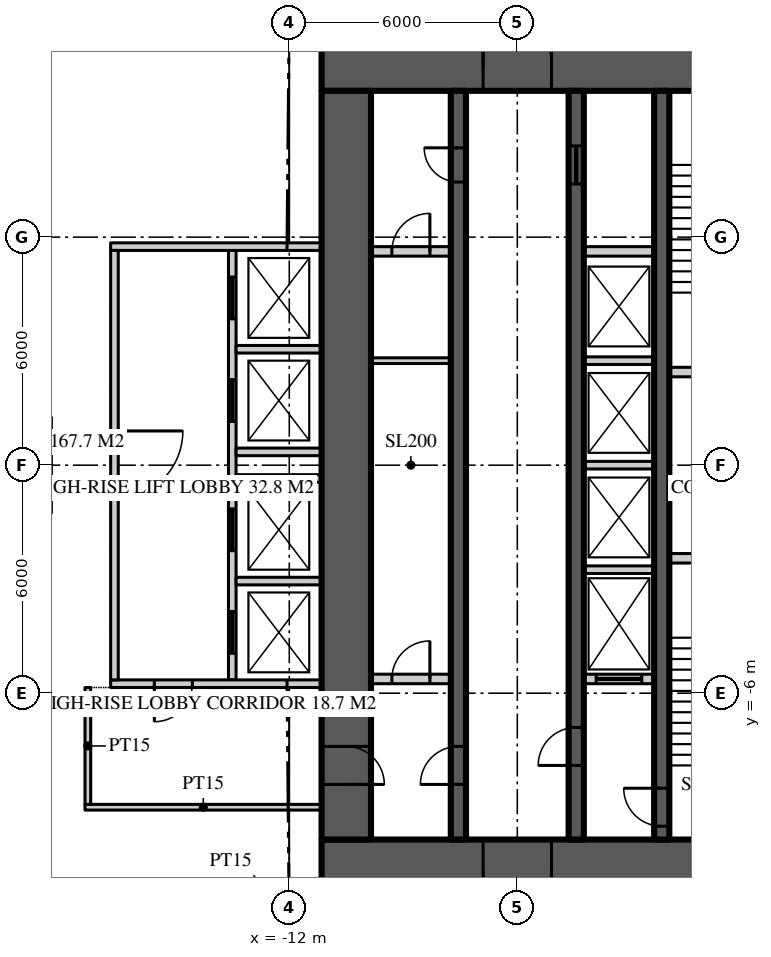
"""IFC4 building model, lengths in metres.
Left out: names, types, materials, properties, quantities, classifications, styles, units other than length and angle.
Written with IfcOpenShell. Run it as: python <this file> out.ifc"""

import sys

from ifc_helpers import new_model, si_unit, direction, frame, frame_2d, origin, place, context, subcontext, project, spatial, rectangle, extrude, element, fill, save


model = new_model("IFC4")
c1 = context("Model", 3, precision=1e-05, world=origin(), true_north=direction((0.0, 1.0)))
c2 = subcontext(c1, "Body", "Model", "MODEL_VIEW")
j1 = project(units=[si_unit("LENGTHUNIT", "METRE"), si_unit("PLANEANGLEUNIT", "RADIAN")], contexts=[c1])
p1 = place(None, origin())
s1 = spatial("IfcSite", under=j1, at=p1, CompositionType="ELEMENT")
p2 = place(p1, origin())
s2 = spatial("IfcBuilding", under=s1, at=p2, CompositionType="ELEMENT")
p3 = place(p2, frame((0.0, 0.0, 194.4)))
s3 = spatial("IfcBuildingStorey", under=s2, at=p3, CompositionType="ELEMENT", Elevation=194.4)
p4 = place(p3, frame((-11.15, 10.5, 0.0), z_axis=(0.0, 0.0, 1.0), x_axis=(1.0, 0.0, 0.0)))
e1 = element("IfcWall", 1, at=p4, inside=s3, PredefinedType="SHEAR", context=c2, shape_type="SweptSolid", body=[
    extrude(rectangle(XDim=22.3, YDim=1.3, at=frame_2d((11.15, 0.0))), origin(), (0.0, 0.0, 1.0), 4.5),
])
p5 = place(p4, frame((4.25, 0.0, 0.0)))
e2 = element("IfcOpeningElement", 2, at=p5, cuts=e1, PredefinedType="OPENING", context=c2, shape_type="SweptSolid", body=[
    extrude(rectangle(XDim=1.8, YDim=2.2, at=frame_2d((0.9, 1.1))), frame((0.0, 0.66, 0.0), z_axis=(0.0, -1.0, 0.0), x_axis=(1.0, 0.0, 0.0)), (0.0, 0.0, 1.0), 1.32),
])
p6 = place(p4, frame((16.25, 0.0, 0.0)))
e3 = element("IfcOpeningElement", 3, at=p6, cuts=e1, PredefinedType="OPENING", context=c2, shape_type="SweptSolid", body=[
    extrude(rectangle(XDim=1.8, YDim=2.2, at=frame_2d((0.9, 1.1))), frame((0.0, 0.66, 0.0), z_axis=(0.0, -1.0, 0.0), x_axis=(1.0, 0.0, 0.0)), (0.0, 0.0, 1.0), 1.32),
])
p7 = place(p3, frame((11.15, -10.5, 0.0), z_axis=(0.0, 0.0, 1.0), x_axis=(-1.0, 0.0, 0.0)))
e4 = element("IfcWall", 4, at=p7, inside=s3, PredefinedType="SHEAR", context=c2, shape_type="SweptSolid", body=[
    extrude(rectangle(XDim=22.3, YDim=1.3, at=frame_2d((11.15, 0.0))), origin(), (0.0, 0.0, 1.0), 4.5),
])
p8 = place(p7, frame((16.25, 0.0, 0.0)))
e5 = element("IfcOpeningElement", 5, at=p8, cuts=e4, PredefinedType="OPENING", context=c2, shape_type="SweptSolid", body=[
    extrude(rectangle(XDim=1.8, YDim=2.2, at=frame_2d((0.9, 1.1))), frame((0.0, 0.66, 0.0), z_axis=(0.0, -1.0, 0.0), x_axis=(1.0, 0.0, 0.0)), (0.0, 0.0, 1.0), 1.32),
])
p9 = place(p7, frame((4.25, 0.0, 0.0)))
e6 = element("IfcOpeningElement", 6, at=p9, cuts=e4, PredefinedType="OPENING", context=c2, shape_type="SweptSolid", body=[
    extrude(rectangle(XDim=1.8, YDim=2.2, at=frame_2d((0.9, 1.1))), frame((0.0, 0.66, 0.0), z_axis=(0.0, -1.0, 0.0), x_axis=(1.0, 0.0, 0.0)), (0.0, 0.0, 1.0), 1.32),
])
p10 = place(p3, frame((-10.5, 9.85, 0.0), z_axis=(0.0, 0.0, 1.0), x_axis=(0.0, -1.0, 0.0)))
e7 = element("IfcWall", 7, at=p10, inside=s3, PredefinedType="SHEAR", context=c2, shape_type="SweptSolid", body=[
    extrude(rectangle(XDim=19.7, YDim=1.3, at=frame_2d((9.85, 0.0))), origin(), (0.0, 0.0, 1.0), 4.5),
])
p11 = place(p10, frame((17.25, 0.0, 0.0)))
e8 = element("IfcOpeningElement", 8, at=p11, cuts=e7, PredefinedType="OPENING", context=c2, shape_type="SweptSolid", body=[
    extrude(rectangle(XDim=1.0, YDim=2.2, at=frame_2d((0.5, 1.1))), frame((0.0, 0.66, 0.0), z_axis=(0.0, -1.0, 0.0), x_axis=(1.0, 0.0, 0.0)), (0.0, 0.0, 1.0), 1.32),
])
p12 = place(p3, frame((-7.55, -9.85, 0.0), z_axis=(0.0, 0.0, 1.0), x_axis=(0.0, 1.0, 0.0)))
e9 = element("IfcWall", 9, at=p12, inside=s3, PredefinedType="SHEAR", context=c2, shape_type="SweptSolid", body=[
    extrude(rectangle(XDim=19.7, YDim=0.4, at=frame_2d((9.85, 0.0))), origin(), (0.0, 0.0, 1.0), 4.5),
])
p13 = place(p12, frame((1.45, 0.0, 0.0)))
e10 = element("IfcOpeningElement", 10, at=p13, cuts=e9, PredefinedType="OPENING", context=c2, shape_type="SweptSolid", body=[
    extrude(rectangle(XDim=1.0, YDim=2.2, at=frame_2d((0.5, 1.1))), frame((0.0, 0.21, 0.0), z_axis=(0.0, -1.0, 0.0), x_axis=(1.0, 0.0, 0.0)), (0.0, 0.0, 1.0), 0.42),
])
p14 = place(p12, frame((17.3, 0.0, 0.0)))
e11 = element("IfcOpeningElement", 11, at=p14, cuts=e9, PredefinedType="OPENING", context=c2, shape_type="SweptSolid", body=[
    extrude(rectangle(XDim=0.9, YDim=2.1, at=frame_2d((0.45, 1.05))), frame((0.0, 0.21, 0.0), z_axis=(0.0, -1.0, 0.0), x_axis=(1.0, 0.0, 0.0)), (0.0, 0.0, 1.0), 0.42),
])
p15 = place(p3, frame((-4.45, -9.85, 0.0), z_axis=(0.0, 0.0, 1.0), x_axis=(0.0, 1.0, 0.0)))
e12 = element("IfcWall", 12, at=p15, inside=s3, PredefinedType="SHEAR", context=c2, shape_type="SweptSolid", body=[
    extrude(rectangle(XDim=19.7, YDim=0.4, at=frame_2d((9.85, 0.0))), origin(), (0.0, 0.0, 1.0), 4.5),
])
p16 = place(p15, frame((1.95, 0.0, 0.0)))
e13 = element("IfcOpeningElement", 13, at=p16, cuts=e12, PredefinedType="OPENING", context=c2, shape_type="SweptSolid", body=[
    extrude(rectangle(XDim=1.0, YDim=2.2, at=frame_2d((0.5, 1.1))), frame((0.0, 0.21, 0.0), z_axis=(0.0, -1.0, 0.0), x_axis=(1.0, 0.0, 0.0)), (0.0, 0.0, 1.0), 0.42),
])
p17 = place(p15, frame((17.25, 0.0, 0.0)))
e14 = element("IfcOpeningElement", 14, at=p17, cuts=e12, PredefinedType="OPENING", context=c2, shape_type="SweptSolid", body=[
    extrude(rectangle(XDim=1.0, YDim=2.1, at=frame_2d((0.5, 1.05))), frame((0.0, 0.21, 0.0), z_axis=(0.0, -1.0, 0.0), x_axis=(1.0, 0.0, 0.0)), (0.0, 0.0, 1.0), 0.42),
])
p18 = place(p3, frame((-2.2, -9.85, 0.0), z_axis=(0.0, 0.0, 1.0), x_axis=(0.0, 1.0, 0.0)))
e15 = element("IfcWall", 15, at=p18, inside=s3, PredefinedType="SHEAR", context=c2, shape_type="SweptSolid", body=[
    extrude(rectangle(XDim=19.7, YDim=0.4, at=frame_2d((9.85, 0.0))), origin(), (0.0, 0.0, 1.0), 4.5),
])
p19 = place(p18, frame((0.35, 0.0, 0.0)))
e16 = element("IfcOpeningElement", 16, at=p19, cuts=e15, PredefinedType="OPENING", context=c2, shape_type="SweptSolid", body=[
    extrude(rectangle(XDim=1.0, YDim=2.2, at=frame_2d((0.5, 1.1))), frame((0.0, 0.21, 0.0), z_axis=(0.0, -1.0, 0.0), x_axis=(1.0, 0.0, 0.0)), (0.0, 0.0, 1.0), 0.42),
])
p20 = place(p3, frame((-9.85, 5.625, 0.0), z_axis=(0.0, 0.0, 1.0), x_axis=(1.0, 0.0, 0.0)))
e17 = element("IfcWall", 17, at=p20, inside=s3, PredefinedType="SOLIDWALL", context=c2, shape_type="SweptSolid", body=[
    extrude(rectangle(XDim=2.1, YDim=0.25, at=frame_2d((1.05, 0.0))), origin(), (0.0, 0.0, 1.0), 4.3),
])
p21 = place(p20, frame((0.55, 0.0, 0.0)))
e18 = element("IfcOpeningElement", 18, at=p21, cuts=e17, PredefinedType="OPENING", context=c2, shape_type="SweptSolid", body=[
    extrude(rectangle(XDim=1.0, YDim=2.2, at=frame_2d((0.5, 1.1))), frame((0.0, 0.135, 0.0), z_axis=(0.0, -1.0, 0.0), x_axis=(1.0, 0.0, 0.0)), (0.0, 0.0, 1.0), 0.27),
])
p22 = place(p3, frame((-4.25, 5.625, 0.0), z_axis=(0.0, 0.0, 1.0), x_axis=(1.0, 0.0, 0.0)))
e19 = element("IfcWall", 19, at=p22, inside=s3, PredefinedType="SOLIDWALL", context=c2, shape_type="SweptSolid", body=[
    extrude(rectangle(XDim=1.85, YDim=0.25, at=frame_2d((0.925, 0.0))), origin(), (0.0, 0.0, 1.0), 4.3),
])
p23 = place(p3, frame((-9.85, -5.625, 0.0), z_axis=(0.0, 0.0, 1.0), x_axis=(1.0, 0.0, 0.0)))
e20 = element("IfcWall", 20, at=p23, inside=s3, PredefinedType="SOLIDWALL", context=c2, shape_type="SweptSolid", body=[
    extrude(rectangle(XDim=2.1, YDim=0.25, at=frame_2d((1.05, 0.0))), origin(), (0.0, 0.0, 1.0), 4.3),
])
p24 = place(p23, frame((0.55, 0.0, 0.0)))
e21 = element("IfcOpeningElement", 21, at=p24, cuts=e20, PredefinedType="OPENING", context=c2, shape_type="SweptSolid", body=[
    extrude(rectangle(XDim=1.0, YDim=2.2, at=frame_2d((0.5, 1.1))), frame((0.0, 0.135, 0.0), z_axis=(0.0, -1.0, 0.0), x_axis=(1.0, 0.0, 0.0)), (0.0, 0.0, 1.0), 0.27),
])
p25 = place(p3, frame((-4.25, -5.625, 0.0), z_axis=(0.0, 0.0, 1.0), x_axis=(1.0, 0.0, 0.0)))
e22 = element("IfcWall", 22, at=p25, inside=s3, PredefinedType="SOLIDWALL", context=c2, shape_type="SweptSolid", body=[
    extrude(rectangle(XDim=1.85, YDim=0.25, at=frame_2d((0.925, 0.0))), origin(), (0.0, 0.0, 1.0), 4.3),
])
p26 = place(p25, frame((0.325, 0.0, 0.0)))
e23 = element("IfcOpeningElement", 23, at=p26, cuts=e22, PredefinedType="OPENING", context=c2, shape_type="SweptSolid", body=[
    extrude(rectangle(XDim=1.2, YDim=2.2, at=frame_2d((0.6, 1.1))), frame((0.0, 0.135, 0.0), z_axis=(0.0, -1.0, 0.0), x_axis=(1.0, 0.0, 0.0)), (0.0, 0.0, 1.0), 0.27),
])
for number, where, z_axis, x_axis in (
    (24, (-2.0, -2.45, 0.0), (0.0, 0.0, 1.0), (1.0, 0.0, 0.0)),
    (25, (-2.0, 2.45, 0.0), (0.0, 0.0, 1.0), (1.0, 0.0, 0.0)),
):
    element("IfcWall", number, at=place(p3, frame(where, z_axis=z_axis, x_axis=x_axis)), inside=s3, PredefinedType="SOLIDWALL", context=c2, shape_type="SweptSolid", body=[
        extrude(rectangle(XDim=4.0, YDim=0.25, at=frame_2d((2.0, 0.0))), origin(), (0.0, 0.0, 1.0), 4.3),
    ])
for number, where, z_axis, x_axis in (
    (26, (-4.25, -2.75, 0.0), (0.0, 0.0, 1.0), (1.0, 0.0, 0.0)),
    (27, (-4.25, 0.0, 0.0), (0.0, 0.0, 1.0), (1.0, 0.0, 0.0)),
    (28, (-4.25, 2.75, 0.0), (0.0, 0.0, 1.0), (1.0, 0.0, 0.0)),
):
    element("IfcWall", number, at=place(p3, frame(where, z_axis=z_axis, x_axis=x_axis)), inside=s3, PredefinedType="SOLIDWALL", context=c2, shape_type="SweptSolid", body=[
        extrude(rectangle(XDim=1.85, YDim=0.2, at=frame_2d((0.925, 0.0))), origin(), (0.0, 0.0, 1.0), 4.3),
    ])
p27 = place(p3, frame((-13.5, 5.65, 0.0), z_axis=(0.0, 0.0, 1.0), x_axis=(0.0, -1.0, 0.0)))
e29 = element("IfcWall", 29, at=p27, inside=s3, PredefinedType="SOLIDWALL", context=c2, shape_type="SweptSolid", body=[
    extrude(rectangle(XDim=11.3, YDim=0.2, at=frame_2d((5.65, 0.0))), origin(), (0.0, 0.0, 1.0), 4.3),
])
p28 = place(p27, frame((0.7, 0.0, 0.0)))
e30 = element("IfcOpeningElement", 30, at=p28, cuts=e29, PredefinedType="OPENING", context=c2, shape_type="SweptSolid", body=[
    extrude(rectangle(XDim=1.1, YDim=2.2, at=frame_2d((0.55, 1.1))), frame((0.0, 0.11, 0.0), z_axis=(0.0, -1.0, 0.0), x_axis=(1.0, 0.0, 0.0)), (0.0, 0.0, 1.0), 0.22),
])
p29 = place(p27, frame((3.4, 0.0, 0.0)))
e31 = element("IfcOpeningElement", 31, at=p29, cuts=e29, PredefinedType="OPENING", context=c2, shape_type="SweptSolid", body=[
    extrude(rectangle(XDim=1.1, YDim=2.2, at=frame_2d((0.55, 1.1))), frame((0.0, 0.11, 0.0), z_axis=(0.0, -1.0, 0.0), x_axis=(1.0, 0.0, 0.0)), (0.0, 0.0, 1.0), 0.22),
])
p30 = place(p27, frame((6.8, 0.0, 0.0)))
e32 = element("IfcOpeningElement", 32, at=p30, cuts=e29, PredefinedType="OPENING", context=c2, shape_type="SweptSolid", body=[
    extrude(rectangle(XDim=1.1, YDim=2.2, at=frame_2d((0.55, 1.1))), frame((0.0, 0.11, 0.0), z_axis=(0.0, -1.0, 0.0), x_axis=(1.0, 0.0, 0.0)), (0.0, 0.0, 1.0), 0.22),
])
p31 = place(p27, frame((9.5, 0.0, 0.0)))
e33 = element("IfcOpeningElement", 33, at=p31, cuts=e29, PredefinedType="OPENING", context=c2, shape_type="SweptSolid", body=[
    extrude(rectangle(XDim=1.1, YDim=2.2, at=frame_2d((0.55, 1.1))), frame((0.0, 0.11, 0.0), z_axis=(0.0, -1.0, 0.0), x_axis=(1.0, 0.0, 0.0)), (0.0, 0.0, 1.0), 0.22),
])
p32 = place(p3, frame((-11.15, 5.75, 0.0), z_axis=(0.0, 0.0, 1.0), x_axis=(-1.0, 0.0, 0.0)))
e34 = element("IfcWall", 34, at=p32, inside=s3, PredefinedType="SOLIDWALL", context=c2, shape_type="SweptSolid", body=[
    extrude(rectangle(XDim=5.55, YDim=0.2, at=frame_2d((2.775, 0.0))), origin(), (0.0, 0.0, 1.0), 4.3),
])
p33 = place(p3, frame((-11.15, -5.75, 0.0), z_axis=(0.0, 0.0, 1.0), x_axis=(-1.0, 0.0, 0.0)))
e35 = element("IfcWall", 35, at=p33, inside=s3, PredefinedType="SOLIDWALL", context=c2, shape_type="SweptSolid", body=[
    extrude(rectangle(XDim=5.55, YDim=0.2, at=frame_2d((2.775, 0.0))), origin(), (0.0, 0.0, 1.0), 4.3),
])
p34 = place(p33, frame((3.4, 0.0, 0.0)))
e36 = element("IfcOpeningElement", 36, at=p34, cuts=e35, PredefinedType="OPENING", context=c2, shape_type="SweptSolid", body=[
    extrude(rectangle(XDim=1.0, YDim=2.2, at=frame_2d((0.5, 1.1))), frame((0.0, 0.11, 0.0), z_axis=(0.0, -1.0, 0.0), x_axis=(1.0, 0.0, 0.0)), (0.0, 0.0, 1.0), 0.22),
])
p35 = place(p3, frame((-11.15, 3.05, 0.0), z_axis=(0.0, 0.0, 1.0), x_axis=(-1.0, 0.0, 0.0)))
e37 = element("IfcWall", 37, at=p35, inside=s3, PredefinedType="SOLIDWALL", context=c2, shape_type="SweptSolid", body=[
    extrude(rectangle(XDim=2.25, YDim=0.2, at=frame_2d((1.125, 0.0))), origin(), (0.0, 0.0, 1.0), 4.3),
])
for number, where, z_axis, x_axis in (
    (38, (-11.15, 0.35, 0.0), (0.0, 0.0, 1.0), (-1.0, 0.0, 0.0)),
    (39, (-11.15, -0.35, 0.0), (0.0, 0.0, 1.0), (-1.0, 0.0, 0.0)),
):
    element("IfcWall", number, at=place(p3, frame(where, z_axis=z_axis, x_axis=x_axis)), inside=s3, PredefinedType="SOLIDWALL", context=c2, shape_type="SweptSolid", body=[
        extrude(rectangle(XDim=2.25, YDim=0.2, at=frame_2d((1.125, 0.0))), origin(), (0.0, 0.0, 1.0), 3.32),
    ])
p36 = place(p3, frame((-11.15, -3.05, 0.0), z_axis=(0.0, 0.0, 1.0), x_axis=(-1.0, 0.0, 0.0)))
e40 = element("IfcWall", 40, at=p36, inside=s3, PredefinedType="SOLIDWALL", context=c2, shape_type="SweptSolid", body=[
    extrude(rectangle(XDim=2.25, YDim=0.2, at=frame_2d((1.125, 0.0))), origin(), (0.0, 0.0, 1.0), 4.3),
])
p37 = place(p3, frame((-16.6, 5.65, 0.0), z_axis=(0.0, 0.0, 1.0), x_axis=(0.0, -1.0, 0.0)))
e41 = element("IfcWall", 41, at=p37, inside=s3, PredefinedType="SOLIDWALL", context=c2, shape_type="SweptSolid", body=[
    extrude(rectangle(XDim=11.3, YDim=0.2, at=frame_2d((5.65, 0.0))), origin(), (0.0, 0.0, 1.0), 3.63),
])
p38 = place(p37, frame((4.75, 0.0, 0.0)))
e42 = element("IfcOpeningElement", 42, at=p38, cuts=e41, PredefinedType="OPENING", context=c2, shape_type="SweptSolid", body=[
    extrude(rectangle(XDim=1.8, YDim=2.2, at=frame_2d((0.9, 1.1))), frame((0.0, 0.11, 0.0), z_axis=(0.0, -1.0, 0.0), x_axis=(1.0, 0.0, 0.0)), (0.0, 0.0, 1.0), 0.22),
])
p39 = place(p3, frame((-11.15, -9.0, 0.0), z_axis=(0.0, 0.0, 1.0), x_axis=(-1.0, 0.0, 0.0)))
e43 = element("IfcWall", 43, at=p39, inside=s3, PredefinedType="PARTITIONING", context=c2, shape_type="SweptSolid", body=[
    extrude(rectangle(XDim=6.225, YDim=0.15, at=frame_2d((3.113, 0.0))), origin(), (0.0, 0.0, 1.0), 4.32),
])
p40 = place(p3, frame((-17.3, -5.85, 0.0), z_axis=(0.0, 0.0, 1.0), x_axis=(0.0, -1.0, 0.0)))
e44 = element("IfcWall", 44, at=p40, inside=s3, PredefinedType="PARTITIONING", context=c2, shape_type="SweptSolid", body=[
    extrude(rectangle(XDim=3.075, YDim=0.15, at=frame_2d((1.538, 0.0))), origin(), (0.0, 0.0, 1.0), 4.32),
])
p41 = place(p3, frame((-9.85, 2.75, 0.0), z_axis=(0.0, 0.0, 1.0), x_axis=(1.0, 0.0, 0.0)))
e45 = element("IfcWall", 45, at=p41, inside=s3, PredefinedType="SOLIDWALL", context=c2, shape_type="SweptSolid", body=[
    extrude(rectangle(XDim=2.1, YDim=0.15, at=frame_2d((1.05, 0.0))), origin(), (0.0, 0.0, 1.0), 4.32),
])
p42 = place(p5, origin())
e46 = element("IfcDoor", 46, at=p42, inside=s3, OperationType="DOUBLE_DOOR_DOUBLE_SWING", PredefinedType="DOOR", context=c2, shape_type="SweptSolid", body=[
    extrude(rectangle(XDim=1.8, YDim=2.2, at=frame_2d((0.9, 1.1))), frame((0.0, 0.025, 0.0), z_axis=(0.0, -1.0, 0.0), x_axis=(1.0, 0.0, 0.0)), (0.0, 0.0, 1.0), 0.05),
])
fill(e2, e46)
p43 = place(p8, origin())
e47 = element("IfcDoor", 47, at=p43, inside=s3, OperationType="DOUBLE_DOOR_DOUBLE_SWING", PredefinedType="DOOR", context=c2, shape_type="SweptSolid", body=[
    extrude(rectangle(XDim=1.8, YDim=2.2, at=frame_2d((0.9, 1.1))), frame((0.0, 0.025, 0.0), z_axis=(0.0, -1.0, 0.0), x_axis=(1.0, 0.0, 0.0)), (0.0, 0.0, 1.0), 0.05),
])
fill(e5, e47)
p44 = place(p13, origin())
e48 = element("IfcDoor", 48, at=p44, inside=s3, OperationType="SINGLE_SWING_LEFT", PredefinedType="DOOR", context=c2, shape_type="SweptSolid", body=[
    extrude(rectangle(XDim=1.0, YDim=2.2, at=frame_2d((0.5, 1.1))), frame((0.0, 0.025, 0.0), z_axis=(0.0, -1.0, 0.0), x_axis=(1.0, 0.0, 0.0)), (0.0, 0.0, 1.0), 0.05),
])
fill(e10, e48)
p45 = place(p11, origin())
e49 = element("IfcDoor", 49, at=p45, inside=s3, OperationType="SINGLE_SWING_RIGHT", PredefinedType="DOOR", context=c2, shape_type="SweptSolid", body=[
    extrude(rectangle(XDim=1.0, YDim=2.2, at=frame_2d((0.5, 1.1))), frame((0.0, 0.025, 0.0), z_axis=(0.0, -1.0, 0.0), x_axis=(1.0, 0.0, 0.0)), (0.0, 0.0, 1.0), 0.05),
])
fill(e8, e49)
p46 = place(p16, origin())
e50 = element("IfcDoor", 50, at=p46, inside=s3, OperationType="SINGLE_SWING_LEFT", PredefinedType="DOOR", context=c2, shape_type="SweptSolid", body=[
    extrude(rectangle(XDim=1.0, YDim=2.2, at=frame_2d((0.5, 1.1))), frame((0.0, 0.025, 0.0), z_axis=(0.0, -1.0, 0.0), x_axis=(1.0, 0.0, 0.0)), (0.0, 0.0, 1.0), 0.05),
])
fill(e13, e50)
p47 = place(p19, origin())
e51 = element("IfcDoor", 51, at=p47, inside=s3, OperationType="SINGLE_SWING_RIGHT", PredefinedType="DOOR", context=c2, shape_type="SweptSolid", body=[
    extrude(rectangle(XDim=1.0, YDim=2.2, at=frame_2d((0.5, 1.1))), frame((0.0, 0.025, 0.0), z_axis=(0.0, -1.0, 0.0), x_axis=(1.0, 0.0, 0.0)), (0.0, 0.0, 1.0), 0.05),
])
fill(e16, e51)
p48 = place(p14, origin())
e52 = element("IfcDoor", 52, at=p48, inside=s3, OperationType="SINGLE_SWING_RIGHT", PredefinedType="DOOR", context=c2, shape_type="SweptSolid", body=[
    extrude(rectangle(XDim=0.9, YDim=2.1, at=frame_2d((0.45, 1.05))), frame((0.0, 0.025, 0.0), z_axis=(0.0, -1.0, 0.0), x_axis=(1.0, 0.0, 0.0)), (0.0, 0.0, 1.0), 0.05),
])
fill(e11, e52)
p49 = place(p17, origin())
e53 = element("IfcDoor", 53, at=p49, inside=s3, OperationType="SLIDING_TO_LEFT", PredefinedType="DOOR", context=c2, shape_type="SweptSolid", body=[
    extrude(rectangle(XDim=1.0, YDim=2.1, at=frame_2d((0.5, 1.05))), frame((0.0, 0.025, 0.0), z_axis=(0.0, -1.0, 0.0), x_axis=(1.0, 0.0, 0.0)), (0.0, 0.0, 1.0), 0.05),
])
fill(e14, e53)
p50 = place(p26, origin())
e54 = element("IfcDoor", 54, at=p50, inside=s3, OperationType="SLIDING_TO_LEFT", PredefinedType="DOOR", context=c2, shape_type="SweptSolid", body=[
    extrude(rectangle(XDim=1.2, YDim=2.2, at=frame_2d((0.6, 1.1))), frame((0.0, 0.025, 0.0), z_axis=(0.0, -1.0, 0.0), x_axis=(1.0, 0.0, 0.0)), (0.0, 0.0, 1.0), 0.05),
])
fill(e23, e54)
p51 = place(p38, origin())
e55 = element("IfcDoor", 55, at=p51, inside=s3, OperationType="DOUBLE_DOOR_DOUBLE_SWING", PredefinedType="DOOR", context=c2, shape_type="SweptSolid", body=[
    extrude(rectangle(XDim=1.8, YDim=2.2, at=frame_2d((0.9, 1.1))), frame((0.0, 0.025, 0.0), z_axis=(0.0, -1.0, 0.0), x_axis=(1.0, 0.0, 0.0)), (0.0, 0.0, 1.0), 0.05),
])
fill(e42, e55)
p52 = place(p28, origin())
e56 = element("IfcDoor", 56, at=p52, inside=s3, OperationType="SLIDING_TO_LEFT", PredefinedType="DOOR", context=c2, shape_type="SweptSolid", body=[
    extrude(rectangle(XDim=1.1, YDim=2.2, at=frame_2d((0.55, 1.1))), frame((0.0, 0.025, 0.0), z_axis=(0.0, -1.0, 0.0), x_axis=(1.0, 0.0, 0.0)), (0.0, 0.0, 1.0), 0.05),
])
fill(e30, e56)
p53 = place(p29, origin())
e57 = element("IfcDoor", 57, at=p53, inside=s3, OperationType="SLIDING_TO_LEFT", PredefinedType="DOOR", context=c2, shape_type="SweptSolid", body=[
    extrude(rectangle(XDim=1.1, YDim=2.2, at=frame_2d((0.55, 1.1))), frame((0.0, 0.025, 0.0), z_axis=(0.0, -1.0, 0.0), x_axis=(1.0, 0.0, 0.0)), (0.0, 0.0, 1.0), 0.05),
])
fill(e31, e57)
p54 = place(p30, origin())
e58 = element("IfcDoor", 58, at=p54, inside=s3, OperationType="SLIDING_TO_LEFT", PredefinedType="DOOR", context=c2, shape_type="SweptSolid", body=[
    extrude(rectangle(XDim=1.1, YDim=2.2, at=frame_2d((0.55, 1.1))), frame((0.0, 0.025, 0.0), z_axis=(0.0, -1.0, 0.0), x_axis=(1.0, 0.0, 0.0)), (0.0, 0.0, 1.0), 0.05),
])
fill(e32, e58)
p55 = place(p31, origin())
e59 = element("IfcDoor", 59, at=p55, inside=s3, OperationType="SLIDING_TO_LEFT", PredefinedType="DOOR", context=c2, shape_type="SweptSolid", body=[
    extrude(rectangle(XDim=1.1, YDim=2.2, at=frame_2d((0.55, 1.1))), frame((0.0, 0.025, 0.0), z_axis=(0.0, -1.0, 0.0), x_axis=(1.0, 0.0, 0.0)), (0.0, 0.0, 1.0), 0.05),
])
fill(e33, e59)
p56 = place(p34, origin())
e60 = element("IfcDoor", 60, at=p56, inside=s3, OperationType="SINGLE_SWING_RIGHT", PredefinedType="DOOR", context=c2, shape_type="SweptSolid", body=[
    extrude(rectangle(XDim=1.0, YDim=2.2, at=frame_2d((0.5, 1.1))), frame((0.0, 0.025, 0.0), z_axis=(0.0, -1.0, 0.0), x_axis=(1.0, 0.0, 0.0)), (0.0, 0.0, 1.0), 0.05),
])
fill(e36, e60)
p57 = place(p21, origin())
e61 = element("IfcDoor", 61, at=p57, inside=s3, OperationType="SINGLE_SWING_RIGHT", PredefinedType="DOOR", context=c2, shape_type="SweptSolid", body=[
    extrude(rectangle(XDim=1.0, YDim=2.2, at=frame_2d((0.5, 1.1))), frame((0.0, 0.025, 0.0), z_axis=(0.0, -1.0, 0.0), x_axis=(1.0, 0.0, 0.0)), (0.0, 0.0, 1.0), 0.05),
])
fill(e18, e61)
p58 = place(p24, origin())
e62 = element("IfcDoor", 62, at=p58, inside=s3, OperationType="SINGLE_SWING_RIGHT", PredefinedType="DOOR", context=c2, shape_type="SweptSolid", body=[
    extrude(rectangle(XDim=1.0, YDim=2.2, at=frame_2d((0.5, 1.1))), frame((0.0, 0.025, 0.0), z_axis=(0.0, -1.0, 0.0), x_axis=(1.0, 0.0, 0.0)), (0.0, 0.0, 1.0), 0.05),
])
fill(e21, e62)
save(model, sys.argv[1])
